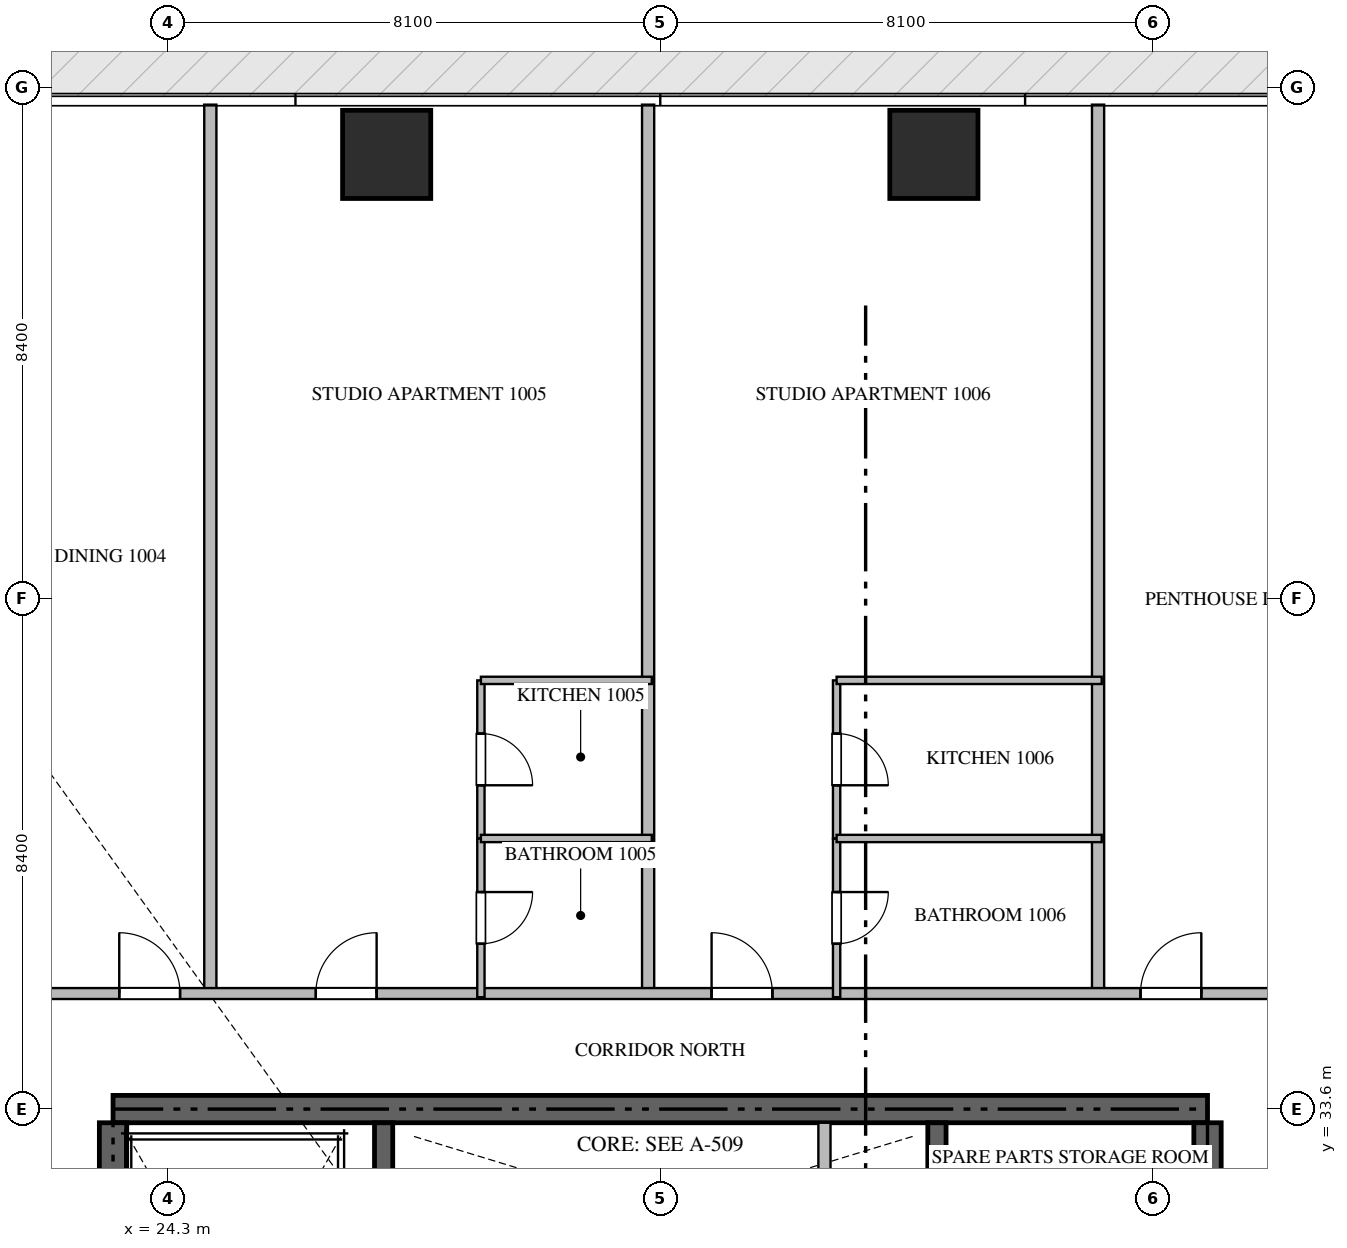
"""IFC4 building model, lengths in metres.
Left out: names, types, materials, properties, quantities, classifications, styles, units other than length and angle.
Written with IfcOpenShell. Run it as: python <this file> out.ifc"""

import sys

from ifc_helpers import new_model, si_unit, direction, frame, frame_2d, origin, origin_2d, place, context, subcontext, project, spatial, rectangle, extrude, source, transform, mapped, element, fill, save


model = new_model("IFC4")
c1 = context("Model", 3, precision=1e-05, world=origin(), true_north=direction((0.0, 1.0)))
c2 = subcontext(c1, "Body", "Model", "MODEL_VIEW")
j1 = project(units=[si_unit("LENGTHUNIT", "METRE"), si_unit("PLANEANGLEUNIT", "RADIAN")], contexts=[c1])
p1 = place(None, origin())
s1 = spatial("IfcSite", under=j1, at=p1, CompositionType="ELEMENT")
p2 = place(p1, origin())
s2 = spatial("IfcBuilding", under=s1, at=p2, CompositionType="ELEMENT")
p3 = place(p2, frame((0.0, 0.0, 45.45)))
s3 = spatial("IfcBuildingStorey", under=s2, at=p3, CompositionType="ELEMENT", Elevation=45.45)
p4 = place(p3, frame((41.4, 33.6, -0.26), z_axis=(0.0, 0.0, 1.0), x_axis=(-1.0, 0.0, 0.0)))
e1 = element("IfcWall", 1, at=p4, inside=s3, PredefinedType="SHEAR", context=c2, shape_type="SweptSolid", body=[
    extrude(rectangle(XDim=18.0, YDim=0.45, at=frame_2d((9.0, 0.0))), origin(), (0.0, 0.0, 1.0), 3.748),
])
p5 = place(p3, frame((23.4, 24.25, -0.26), z_axis=(0.0, 0.0, 1.0), x_axis=(0.0, 1.0, 0.0)))
e2 = element("IfcWall", 2, at=p5, inside=s3, PredefinedType="SHEAR", context=c2, shape_type="SweptSolid", body=[
    extrude(rectangle(XDim=9.125, YDim=0.45, at=frame_2d((4.562, 0.0))), origin(), (0.0, 0.0, 1.0), 3.748),
])
p6 = place(p3, frame((41.4, 27.75, -0.26), z_axis=(0.0, 0.0, 1.0), x_axis=(0.0, 1.0, 0.0)))
e3 = element("IfcWall", 3, at=p6, inside=s3, PredefinedType="SHEAR", context=c2, shape_type="SweptSolid", body=[
    extrude(rectangle(XDim=5.625, YDim=0.45, at=frame_2d((2.812, 0.0))), origin(), (0.0, 0.0, 1.0), 3.748),
])
p7 = place(p3, frame((27.85, 23.55, -0.26), z_axis=(0.0, 0.0, 1.0), x_axis=(0.0, 1.0, 0.0)))
e4 = element("IfcWall", 4, at=p7, inside=s3, PredefinedType="SHEAR", context=c2, shape_type="SweptSolid", body=[
    extrude(rectangle(XDim=9.825, YDim=0.3, at=frame_2d((4.913, 0.0))), origin(), (0.0, 0.0, 1.0), 3.748),
])
p8 = place(p3, frame((36.95, 27.05, -0.26), z_axis=(0.0, 0.0, 1.0), x_axis=(0.0, 1.0, 0.0)))
e5 = element("IfcWall", 5, at=p8, inside=s3, PredefinedType="SHEAR", context=c2, shape_type="SweptSolid", body=[
    extrude(rectangle(XDim=6.325, YDim=0.3, at=frame_2d((3.163, 0.0))), origin(), (0.0, 0.0, 1.0), 3.748),
])
m1 = source(origin(), c2, "Body", "SweptSolid", [
    extrude(rectangle(XDim=1.45, YDim=1.45, at=origin_2d()), origin(), (0.0, 0.0, 1.0), 3.75),
])
for number, where, z_axis, x_axis in (
    (6, (27.9, 49.3, -0.26), (0.0, 0.0, 1.0), (1.0, 0.0, 0.0)),
    (7, (36.9, 49.3, -0.26), (0.0, 0.0, 1.0), (1.0, 0.0, 0.0)),
):
    element("IfcColumn", number, at=place(p3, frame(where, z_axis=z_axis, x_axis=x_axis)), inside=s3, PredefinedType="COLUMN", context=c2, shape_type="MappedRepresentation", body=[
        mapped(m1, transform((0.0, 0.0, 0.0), scale=1.0)),
    ])
p9 = place(p3, frame((35.1, 30.75, 0.0), z_axis=(0.0, 0.0, 1.0), x_axis=(0.0, 1.0, 0.0)))
e8 = element("IfcWall", 8, at=p9, inside=s3, PredefinedType="STANDARD", context=c2, shape_type="SweptSolid", body=[
    extrude(rectangle(XDim=2.625, YDim=0.2, at=frame_2d((1.312, 0.0))), origin(), (0.0, 0.0, 1.0), 3.49),
])
for number, where, z_axis, x_axis in (
    (9, (25.0, 35.5, 0.0), (0.0, 0.0, 1.0), (0.0, 1.0, 0.0)),
    (10, (32.2, 35.5, 0.0), (0.0, 0.0, 1.0), (0.0, 1.0, 0.0)),
    (11, (39.6, 35.5, 0.0), (0.0, 0.0, 1.0), (0.0, 1.0, 0.0)),
):
    element("IfcWall", number, at=place(p3, frame(where, z_axis=z_axis, x_axis=x_axis)), inside=s3, PredefinedType="PARTITIONING", context=c2, shape_type="SweptSolid", body=[
        extrude(rectangle(XDim=14.618, YDim=0.2, at=frame_2d((7.309, 0.0))), origin(), (0.0, 0.0, 1.0), 3.49),
    ])
p10 = place(p3, frame((21.402, 35.5, 0.0), z_axis=(0.0, 0.0, 1.0), x_axis=(1.0, 0.0, 0.0)))
e12 = element("IfcWall", 12, at=p10, inside=s3, PredefinedType="PARTITIONING", context=c2, shape_type="SweptSolid", body=[
    extrude(rectangle(XDim=21.996, YDim=0.18, at=frame_2d((10.998, 0.0))), origin(), (0.0, 0.0, 1.0), 3.49),
])
p11 = place(p10, frame((2.1, 0.0, 0.0)))
e13 = element("IfcOpeningElement", 13, at=p11, cuts=e12, PredefinedType="OPENING", context=c2, shape_type="SweptSolid", body=[
    extrude(rectangle(XDim=1.0, YDim=2.15, at=frame_2d((0.5, 1.075))), frame((0.0, 0.1, 0.0), z_axis=(0.0, -1.0, 0.0), x_axis=(1.0, 0.0, 0.0)), (0.0, 0.0, 1.0), 0.2),
])
p12 = place(p10, frame((5.333, 0.0, 0.0)))
e14 = element("IfcOpeningElement", 14, at=p12, cuts=e12, PredefinedType="OPENING", context=c2, shape_type="SweptSolid", body=[
    extrude(rectangle(XDim=1.0, YDim=2.15, at=frame_2d((0.5, 1.075))), frame((0.0, 0.1, 0.0), z_axis=(0.0, -1.0, 0.0), x_axis=(1.0, 0.0, 0.0)), (0.0, 0.0, 1.0), 0.2),
])
p13 = place(p10, frame((11.842, 0.0, 0.0)))
e15 = element("IfcOpeningElement", 15, at=p13, cuts=e12, PredefinedType="OPENING", context=c2, shape_type="SweptSolid", body=[
    extrude(rectangle(XDim=1.0, YDim=2.15, at=frame_2d((0.5, 1.075))), frame((0.0, 0.1, 0.0), z_axis=(0.0, -1.0, 0.0), x_axis=(1.0, 0.0, 0.0)), (0.0, 0.0, 1.0), 0.2),
])
p14 = place(p10, frame((18.896, 0.0, 0.0)))
e16 = element("IfcOpeningElement", 16, at=p14, cuts=e12, PredefinedType="OPENING", context=c2, shape_type="SweptSolid", body=[
    extrude(rectangle(XDim=1.0, YDim=2.15, at=frame_2d((0.5, 1.075))), frame((0.0, 0.1, 0.0), z_axis=(0.0, -1.0, 0.0), x_axis=(1.0, 0.0, 0.0)), (0.0, 0.0, 1.0), 0.2),
])
p15 = place(p3, frame((29.45, 40.65, 0.0), z_axis=(0.0, 0.0, 1.0), x_axis=(0.0, -1.0, 0.0)))
e17 = element("IfcWall", 17, at=p15, inside=s3, PredefinedType="PARTITIONING", context=c2, shape_type="SweptSolid", body=[
    extrude(rectangle(XDim=2.6, YDim=0.12, at=frame_2d((1.3, 0.0))), origin(), (0.0, 0.0, 1.0), 3.49),
])
p16 = place(p15, frame((0.875, 0.0, 0.0)))
e18 = element("IfcOpeningElement", 18, at=p16, cuts=e17, PredefinedType="OPENING", context=c2, shape_type="SweptSolid", body=[
    extrude(rectangle(XDim=0.85, YDim=2.1, at=frame_2d((0.425, 1.05))), frame((0.0, 0.07, 0.0), z_axis=(0.0, -1.0, 0.0), x_axis=(1.0, 0.0, 0.0)), (0.0, 0.0, 1.0), 0.14),
])
p17 = place(p3, frame((29.45, 38.048, 0.0), z_axis=(0.0, 0.0, 1.0), x_axis=(0.0, -1.0, 0.0)))
e19 = element("IfcWall", 19, at=p17, inside=s3, PredefinedType="PARTITIONING", context=c2, shape_type="SweptSolid", body=[
    extrude(rectangle(XDim=2.608, YDim=0.12, at=frame_2d((1.304, 0.0))), origin(), (0.0, 0.0, 1.0), 3.49),
])
p18 = place(p17, frame((0.879, 0.0, 0.0)))
e20 = element("IfcOpeningElement", 20, at=p18, cuts=e19, PredefinedType="OPENING", context=c2, shape_type="SweptSolid", body=[
    extrude(rectangle(XDim=0.85, YDim=2.1, at=frame_2d((0.425, 1.05))), frame((0.0, 0.07, 0.0), z_axis=(0.0, -1.0, 0.0), x_axis=(1.0, 0.0, 0.0)), (0.0, 0.0, 1.0), 0.14),
])
for number, where, z_axis, x_axis in (
    (21, (29.45, 38.05, 0.0), (0.0, 0.0, 1.0), (1.0, 0.0, 0.0)),
    (22, (29.45, 40.65, 0.0), (0.0, 0.0, 1.0), (1.0, 0.0, 0.0)),
):
    element("IfcWall", number, at=place(p3, frame(where, z_axis=z_axis, x_axis=x_axis)), inside=s3, PredefinedType="PARTITIONING", context=c2, shape_type="SweptSolid", body=[
        extrude(rectangle(XDim=2.81, YDim=0.12, at=frame_2d((1.405, 0.0))), origin(), (0.0, 0.0, 1.0), 3.49),
    ])
p19 = place(p3, frame((35.3, 40.65, 0.0), z_axis=(0.0, 0.0, 1.0), x_axis=(0.0, -1.0, 0.0)))
e23 = element("IfcWall", 23, at=p19, inside=s3, PredefinedType="PARTITIONING", context=c2, shape_type="SweptSolid", body=[
    extrude(rectangle(XDim=2.6, YDim=0.12, at=frame_2d((1.3, 0.0))), origin(), (0.0, 0.0, 1.0), 3.49),
])
p20 = place(p19, frame((0.875, 0.0, 0.0)))
e24 = element("IfcOpeningElement", 24, at=p20, cuts=e23, PredefinedType="OPENING", context=c2, shape_type="SweptSolid", body=[
    extrude(rectangle(XDim=0.85, YDim=2.1, at=frame_2d((0.425, 1.05))), frame((0.0, 0.07, 0.0), z_axis=(0.0, -1.0, 0.0), x_axis=(1.0, 0.0, 0.0)), (0.0, 0.0, 1.0), 0.14),
])
p21 = place(p3, frame((35.3, 38.048, 0.0), z_axis=(0.0, 0.0, 1.0), x_axis=(0.0, -1.0, 0.0)))
e25 = element("IfcWall", 25, at=p21, inside=s3, PredefinedType="PARTITIONING", context=c2, shape_type="SweptSolid", body=[
    extrude(rectangle(XDim=2.608, YDim=0.12, at=frame_2d((1.304, 0.0))), origin(), (0.0, 0.0, 1.0), 3.49),
])
p22 = place(p21, frame((0.879, 0.0, 0.0)))
e26 = element("IfcOpeningElement", 26, at=p22, cuts=e25, PredefinedType="OPENING", context=c2, shape_type="SweptSolid", body=[
    extrude(rectangle(XDim=0.85, YDim=2.1, at=frame_2d((0.425, 1.05))), frame((0.0, 0.07, 0.0), z_axis=(0.0, -1.0, 0.0), x_axis=(1.0, 0.0, 0.0)), (0.0, 0.0, 1.0), 0.14),
])
for number, where, z_axis, x_axis in (
    (27, (35.3, 38.05, 0.0), (0.0, 0.0, 1.0), (1.0, 0.0, 0.0)),
    (28, (35.3, 40.65, 0.0), (0.0, 0.0, 1.0), (1.0, 0.0, 0.0)),
):
    element("IfcWall", number, at=place(p3, frame(where, z_axis=z_axis, x_axis=x_axis)), inside=s3, PredefinedType="PARTITIONING", context=c2, shape_type="SweptSolid", body=[
        extrude(rectangle(XDim=4.36, YDim=0.12, at=frame_2d((2.18, 0.0))), origin(), (0.0, 0.0, 1.0), 3.49),
    ])
m2 = source(origin(), c2, "Body", "SweptSolid", [
    extrude(rectangle(XDim=1.0, YDim=2.15, at=frame_2d((0.5, 1.075))), frame((0.0, 0.025, 0.0), z_axis=(0.0, -1.0, 0.0), x_axis=(1.0, 0.0, 0.0)), (0.0, 0.0, 1.0), 0.05),
])
p23 = place(p11, origin())
e29 = element("IfcDoor", 29, at=p23, inside=s3, OperationType="SINGLE_SWING_LEFT", PredefinedType="DOOR", context=c2, shape_type="MappedRepresentation", body=[
    mapped(m2, transform((0.0, 0.0, 0.0), scale=1.0)),
])
fill(e13, e29)
p24 = place(p12, origin())
e30 = element("IfcDoor", 30, at=p24, inside=s3, OperationType="SINGLE_SWING_RIGHT", PredefinedType="DOOR", context=c2, shape_type="MappedRepresentation", body=[
    mapped(m2, transform((0.0, 0.0, 0.0), scale=1.0)),
])
fill(e14, e30)
p25 = place(p13, origin())
e31 = element("IfcDoor", 31, at=p25, inside=s3, OperationType="SINGLE_SWING_LEFT", PredefinedType="DOOR", context=c2, shape_type="MappedRepresentation", body=[
    mapped(m2, transform((0.0, 0.0, 0.0), scale=1.0)),
])
fill(e15, e31)
p26 = place(p14, origin())
e32 = element("IfcDoor", 32, at=p26, inside=s3, OperationType="SINGLE_SWING_RIGHT", PredefinedType="DOOR", context=c2, shape_type="MappedRepresentation", body=[
    mapped(m2, transform((0.0, 0.0, 0.0), scale=1.0)),
])
fill(e16, e32)
m3 = source(origin(), c2, "Body", "SweptSolid", [
    extrude(rectangle(XDim=0.85, YDim=2.1, at=frame_2d((0.425, 1.05))), frame((0.0, 0.025, 0.0), z_axis=(0.0, -1.0, 0.0), x_axis=(1.0, 0.0, 0.0)), (0.0, 0.0, 1.0), 0.05),
])
p27 = place(p16, origin())
e33 = element("IfcDoor", 33, at=p27, inside=s3, OperationType="SINGLE_SWING_RIGHT", PredefinedType="DOOR", context=c2, shape_type="MappedRepresentation", body=[
    mapped(m3, transform((0.0, 0.0, 0.0), scale=1.0)),
])
fill(e18, e33)
p28 = place(p18, origin())
e34 = element("IfcDoor", 34, at=p28, inside=s3, OperationType="SINGLE_SWING_LEFT", PredefinedType="DOOR", context=c2, shape_type="MappedRepresentation", body=[
    mapped(m3, transform((0.0, 0.0, 0.0), scale=1.0)),
])
fill(e20, e34)
p29 = place(p20, origin())
e35 = element("IfcDoor", 35, at=p29, inside=s3, OperationType="SINGLE_SWING_RIGHT", PredefinedType="DOOR", context=c2, shape_type="MappedRepresentation", body=[
    mapped(m3, transform((0.0, 0.0, 0.0), scale=1.0)),
])
fill(e24, e35)
p30 = place(p22, origin())
e36 = element("IfcDoor", 36, at=p30, inside=s3, OperationType="SINGLE_SWING_LEFT", PredefinedType="DOOR", context=c2, shape_type="MappedRepresentation", body=[
    mapped(m3, transform((0.0, 0.0, 0.0), scale=1.0)),
])
fill(e26, e36)
save(model, sys.argv[1])
